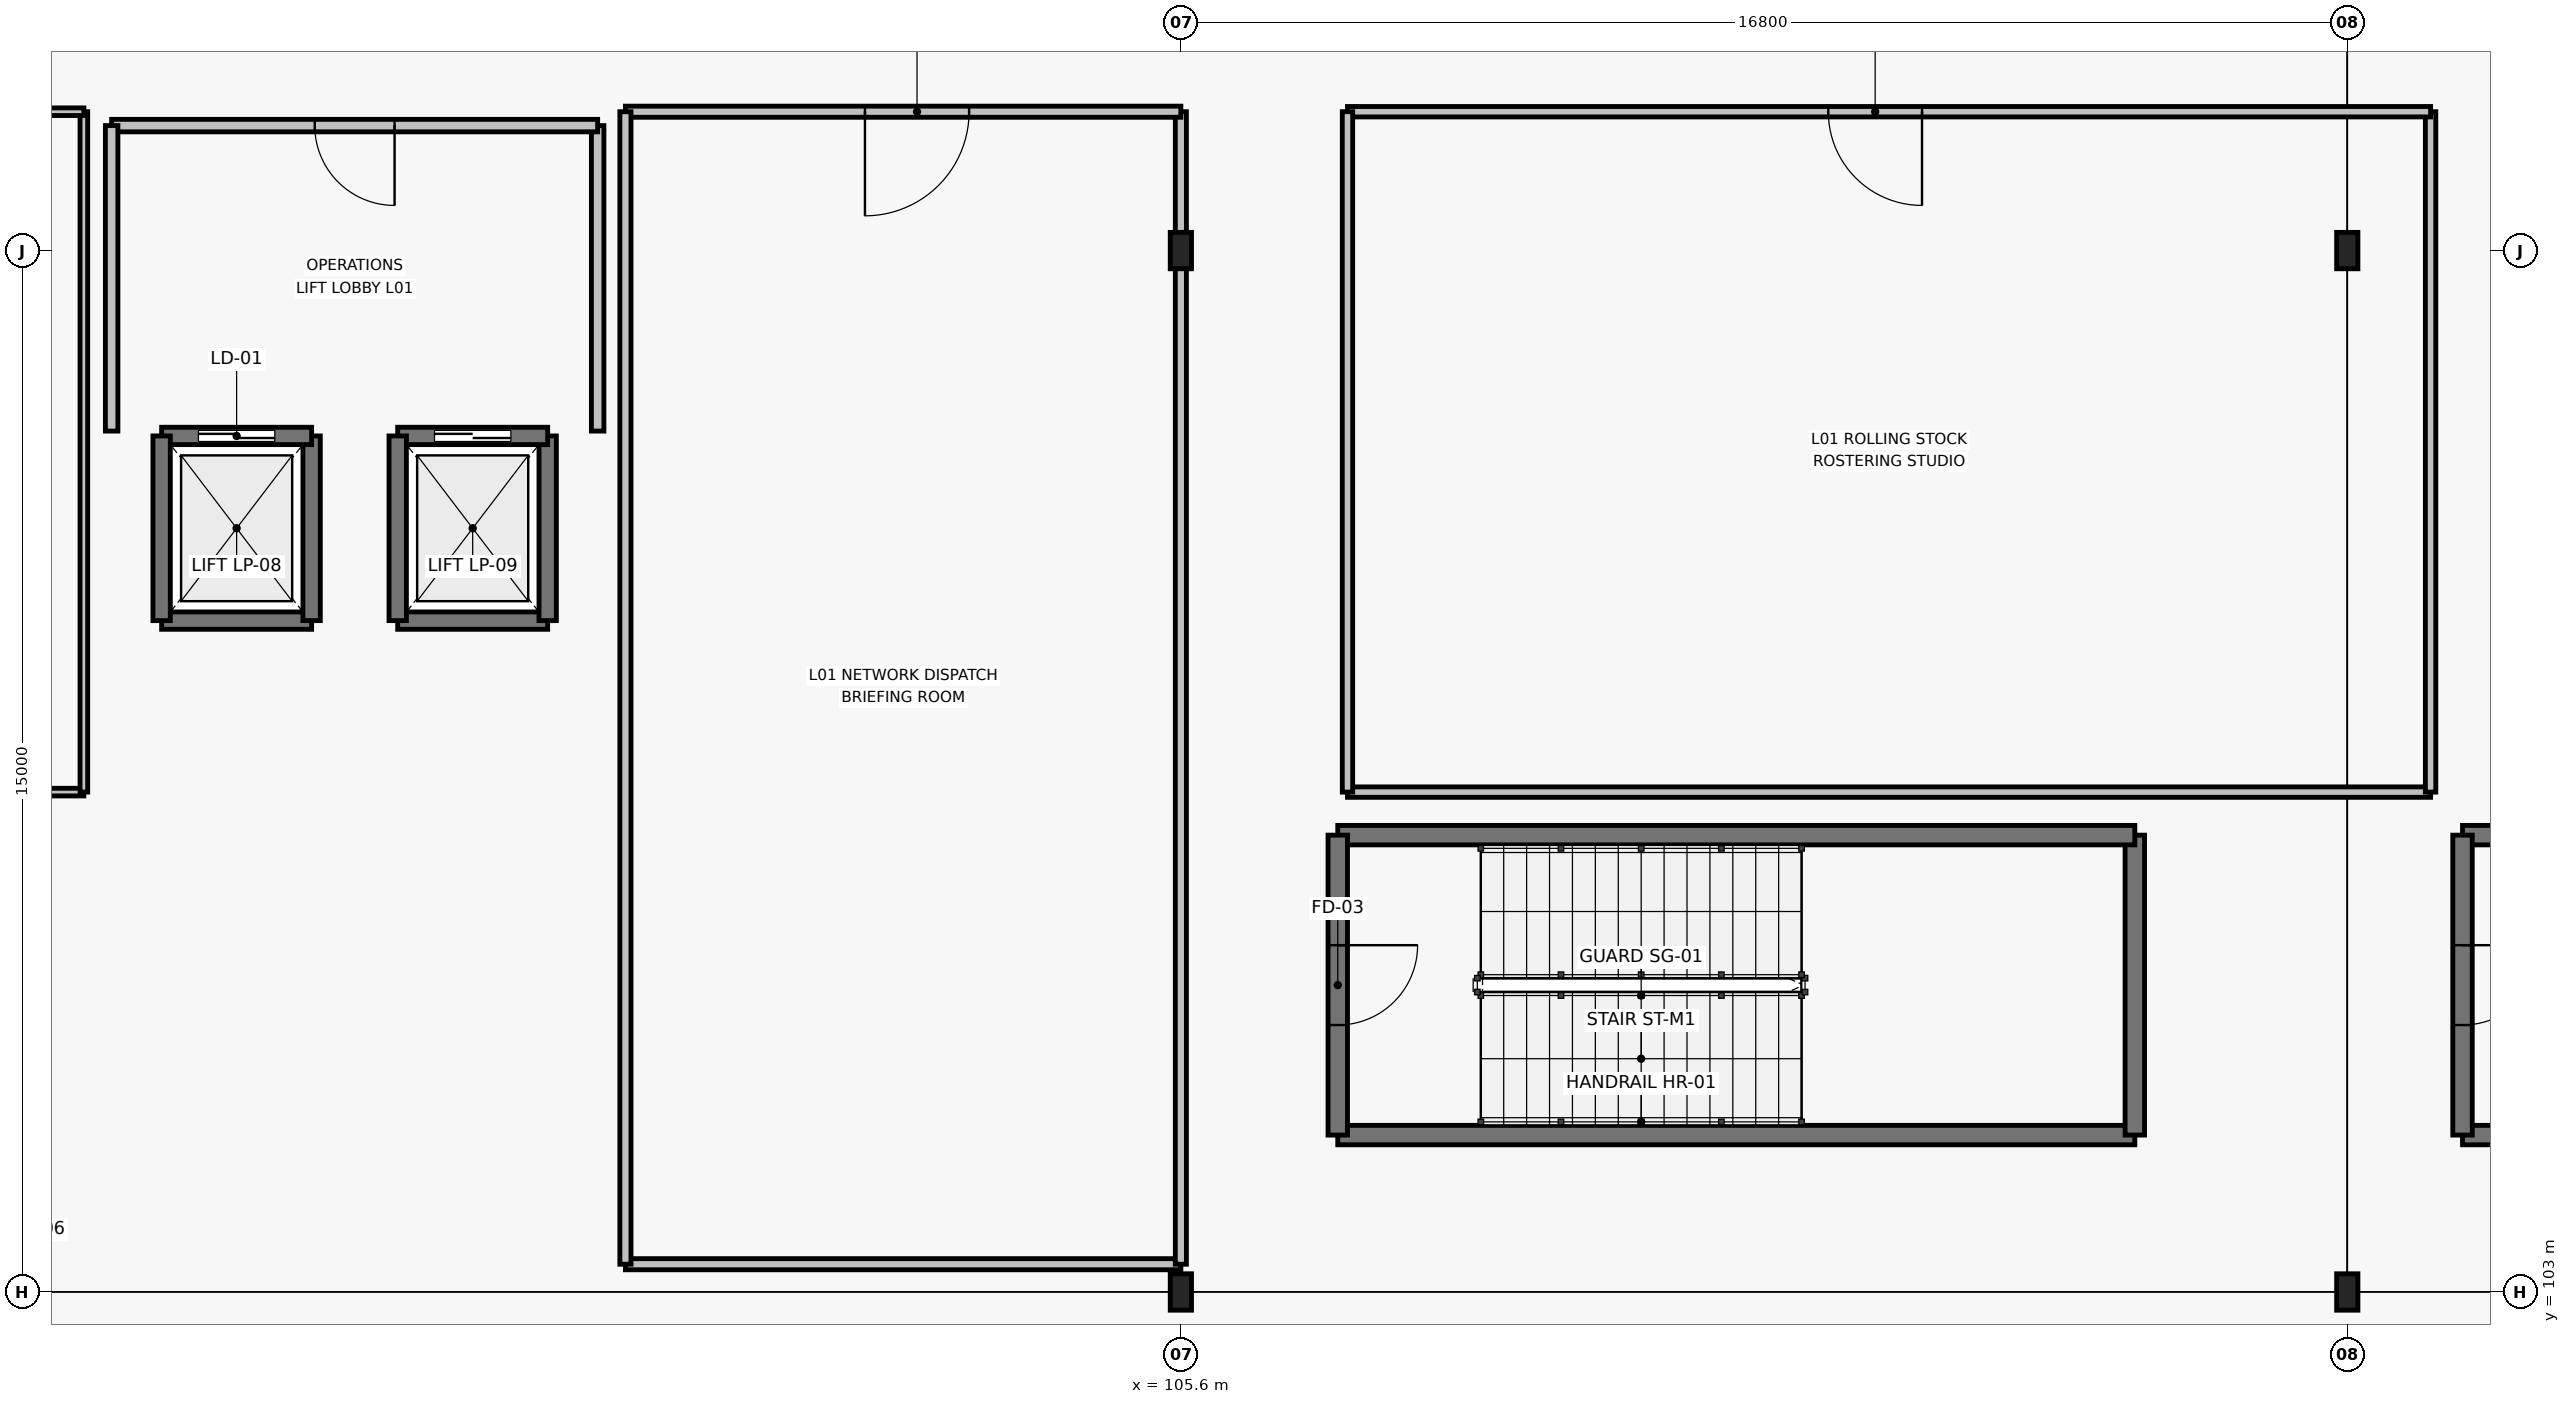
"""IFC4 building model, lengths in metres.
Left out: names, types, materials, properties, quantities, classifications, styles, units other than length and angle.
Written with IfcOpenShell. Run it as: python <this file> out.ifc"""

import sys

from ifc_helpers import new_model, si_unit, direction, frame, frame_2d, origin, origin_2d, place, context, subcontext, project, spatial, rectangle, i_section, extrude, element, fill, save


model = new_model("IFC4")
c1 = context("Model", 3, precision=1e-05, world=origin(), true_north=direction((0.0, 1.0)))
c2 = subcontext(c1, "Body", "Model", "MODEL_VIEW")
j1 = project(units=[si_unit("LENGTHUNIT", "METRE"), si_unit("PLANEANGLEUNIT", "RADIAN")], contexts=[c1])
p1 = place(None, origin())
s1 = spatial("IfcSite", under=j1, at=p1, CompositionType="ELEMENT")
p2 = place(p1, origin())
s2 = spatial("IfcBuilding", under=s1, at=p2, CompositionType="ELEMENT")
p3 = place(p2, frame((0.0, 0.0, 5.4)))
s3 = spatial("IfcBuildingStorey", under=s2, at=p3, CompositionType="ELEMENT", Elevation=5.4)
for number, where, z_axis, x_axis in (
    (1, (105.6, 103.0, 0.0), (0.0, 0.0, 1.0), (1.0, 0.0, 0.0)),
    (2, (105.6, 118.0, 0.0), (0.0, 0.0, 1.0), (1.0, 0.0, 0.0)),
    (3, (122.4, 103.0, 0.0), (0.0, 0.0, 1.0), (1.0, 0.0, 0.0)),
    (4, (122.4, 118.0, 0.0), (0.0, 0.0, 1.0), (1.0, 0.0, 0.0)),
):
    element("IfcColumn", number, at=place(p3, frame(where, z_axis=z_axis, x_axis=x_axis)), inside=s3, PredefinedType="COLUMN", context=c2, shape_type="SweptSolid", body=[
        extrude(i_section(OverallWidth=0.306, OverallDepth=0.524, WebThickness=0.021, FlangeThickness=0.04, FilletRadius=0.027, at=origin_2d()), origin(), (0.0, 0.0, 1.0), 5.4),
    ])
p4 = place(p3, frame((107.86, 105.26, 0.0), z_axis=(0.0, 0.0, 1.0), x_axis=(1.0, 0.0, 0.0)))
e5 = element("IfcWall", 5, at=p4, inside=s3, PredefinedType="SHEAR", context=c2, shape_type="SweptSolid", body=[
    extrude(rectangle(XDim=11.48, YDim=0.28, at=frame_2d((5.74, 0.0))), origin(), (0.0, 0.0, 1.0), 5.16),
])
p5 = place(p3, frame((119.34, 105.26, 0.0), z_axis=(0.0, 0.0, 1.0), x_axis=(0.0, 1.0, 0.0)))
e6 = element("IfcWall", 6, at=p5, inside=s3, PredefinedType="SHEAR", context=c2, shape_type="SweptSolid", body=[
    extrude(rectangle(XDim=4.32, YDim=0.28, at=frame_2d((2.16, 0.0))), origin(), (0.0, 0.0, 1.0), 5.16),
])
p6 = place(p3, frame((119.34, 109.58, 0.0), z_axis=(0.0, 0.0, 1.0), x_axis=(-1.0, 0.0, 0.0)))
e7 = element("IfcWall", 7, at=p6, inside=s3, PredefinedType="SHEAR", context=c2, shape_type="SweptSolid", body=[
    extrude(rectangle(XDim=11.48, YDim=0.28, at=frame_2d((5.74, 0.0))), origin(), (0.0, 0.0, 1.0), 5.16),
])
p7 = place(p3, frame((107.86, 109.58, 0.0), z_axis=(0.0, 0.0, 1.0), x_axis=(0.0, -1.0, 0.0)))
e8 = element("IfcWall", 8, at=p7, inside=s3, PredefinedType="SHEAR", context=c2, shape_type="SweptSolid", body=[
    extrude(rectangle(XDim=4.32, YDim=0.28, at=frame_2d((2.16, 0.0))), origin(), (0.0, 0.0, 1.0), 5.16),
])
p8 = place(p7, frame((1.585, 0.0, 0.0)))
e9 = element("IfcOpeningElement", 9, at=p8, cuts=e8, PredefinedType="OPENING", context=c2, shape_type="SweptSolid", body=[
    extrude(rectangle(XDim=1.15, YDim=2.2, at=frame_2d((0.575, 1.1))), frame((0.0, 0.15, 0.0), z_axis=(0.0, -1.0, 0.0), x_axis=(1.0, 0.0, 0.0)), (0.0, 0.0, 1.0), 0.3),
])
for number, where, z_axis, x_axis in (
    (10, (124.06, 105.26, 0.0), (0.0, 0.0, 1.0), (1.0, 0.0, 0.0)),
    (11, (135.54, 109.58, 0.0), (0.0, 0.0, 1.0), (-1.0, 0.0, 0.0)),
):
    element("IfcWall", number, at=place(p3, frame(where, z_axis=z_axis, x_axis=x_axis)), inside=s3, PredefinedType="SHEAR", context=c2, shape_type="SweptSolid", body=[
        extrude(rectangle(XDim=11.48, YDim=0.28, at=frame_2d((5.74, 0.0))), origin(), (0.0, 0.0, 1.0), 5.16),
    ])
p9 = place(p3, frame((124.06, 109.58, 0.0), z_axis=(0.0, 0.0, 1.0), x_axis=(0.0, -1.0, 0.0)))
e12 = element("IfcWall", 12, at=p9, inside=s3, PredefinedType="SHEAR", context=c2, shape_type="SweptSolid", body=[
    extrude(rectangle(XDim=4.32, YDim=0.28, at=frame_2d((2.16, 0.0))), origin(), (0.0, 0.0, 1.0), 5.16),
])
p10 = place(p9, frame((1.585, 0.0, 0.0)))
e13 = element("IfcOpeningElement", 13, at=p10, cuts=e12, PredefinedType="OPENING", context=c2, shape_type="SweptSolid", body=[
    extrude(rectangle(XDim=1.15, YDim=2.2, at=frame_2d((0.575, 1.1))), frame((0.0, 0.15, 0.0), z_axis=(0.0, -1.0, 0.0), x_axis=(1.0, 0.0, 0.0)), (0.0, 0.0, 1.0), 0.3),
])
p11 = place(p3, frame((90.92, 112.67, 0.0), z_axis=(0.0, 0.0, 1.0), x_axis=(1.0, 0.0, 0.0)))
e14 = element("IfcWall", 14, at=p11, inside=s3, PredefinedType="SHEAR", context=c2, shape_type="SweptSolid", body=[
    extrude(rectangle(XDim=2.16, YDim=0.25, at=frame_2d((1.08, 0.0))), origin(), (0.0, 0.0, 1.0), 5.16),
])
p12 = place(p3, frame((93.08, 112.67, 0.0), z_axis=(0.0, 0.0, 1.0), x_axis=(0.0, 1.0, 0.0)))
e15 = element("IfcWall", 15, at=p12, inside=s3, PredefinedType="SHEAR", context=c2, shape_type="SweptSolid", body=[
    extrude(rectangle(XDim=2.66, YDim=0.25, at=frame_2d((1.33, 0.0))), origin(), (0.0, 0.0, 1.0), 5.16),
])
p13 = place(p3, frame((93.08, 115.33, 0.0), z_axis=(0.0, 0.0, 1.0), x_axis=(-1.0, 0.0, 0.0)))
e16 = element("IfcWall", 16, at=p13, inside=s3, PredefinedType="SHEAR", context=c2, shape_type="SweptSolid", body=[
    extrude(rectangle(XDim=2.16, YDim=0.25, at=frame_2d((1.08, 0.0))), origin(), (0.0, 0.0, 1.0), 5.16),
])
p14 = place(p13, frame((0.53, 0.0, 0.0)))
e17 = element("IfcOpeningElement", 17, at=p14, cuts=e16, PredefinedType="OPENING", context=c2, shape_type="SweptSolid", body=[
    extrude(rectangle(XDim=1.1, YDim=2.2, at=frame_2d((0.55, 1.1))), frame((0.0, 0.135, 0.0), z_axis=(0.0, -1.0, 0.0), x_axis=(1.0, 0.0, 0.0)), (0.0, 0.0, 1.0), 0.27),
])
p15 = place(p3, frame((90.92, 115.33, 0.0), z_axis=(0.0, 0.0, 1.0), x_axis=(0.0, -1.0, 0.0)))
e18 = element("IfcWall", 18, at=p15, inside=s3, PredefinedType="SHEAR", context=c2, shape_type="SweptSolid", body=[
    extrude(rectangle(XDim=2.66, YDim=0.25, at=frame_2d((1.33, 0.0))), origin(), (0.0, 0.0, 1.0), 5.16),
])
p16 = place(p3, frame((94.32, 112.67, 0.0), z_axis=(0.0, 0.0, 1.0), x_axis=(1.0, 0.0, 0.0)))
e19 = element("IfcWall", 19, at=p16, inside=s3, PredefinedType="SHEAR", context=c2, shape_type="SweptSolid", body=[
    extrude(rectangle(XDim=2.16, YDim=0.25, at=frame_2d((1.08, 0.0))), origin(), (0.0, 0.0, 1.0), 5.16),
])
p17 = place(p3, frame((96.48, 112.67, 0.0), z_axis=(0.0, 0.0, 1.0), x_axis=(0.0, 1.0, 0.0)))
e20 = element("IfcWall", 20, at=p17, inside=s3, PredefinedType="SHEAR", context=c2, shape_type="SweptSolid", body=[
    extrude(rectangle(XDim=2.66, YDim=0.25, at=frame_2d((1.33, 0.0))), origin(), (0.0, 0.0, 1.0), 5.16),
])
p18 = place(p3, frame((96.48, 115.33, 0.0), z_axis=(0.0, 0.0, 1.0), x_axis=(-1.0, 0.0, 0.0)))
e21 = element("IfcWall", 21, at=p18, inside=s3, PredefinedType="SHEAR", context=c2, shape_type="SweptSolid", body=[
    extrude(rectangle(XDim=2.16, YDim=0.25, at=frame_2d((1.08, 0.0))), origin(), (0.0, 0.0, 1.0), 5.16),
])
p19 = place(p18, frame((0.53, 0.0, 0.0)))
e22 = element("IfcOpeningElement", 22, at=p19, cuts=e21, PredefinedType="OPENING", context=c2, shape_type="SweptSolid", body=[
    extrude(rectangle(XDim=1.1, YDim=2.2, at=frame_2d((0.55, 1.1))), frame((0.0, 0.135, 0.0), z_axis=(0.0, -1.0, 0.0), x_axis=(1.0, 0.0, 0.0)), (0.0, 0.0, 1.0), 0.27),
])
p20 = place(p3, frame((94.32, 115.33, 0.0), z_axis=(0.0, 0.0, 1.0), x_axis=(0.0, -1.0, 0.0)))
e23 = element("IfcWall", 23, at=p20, inside=s3, PredefinedType="SHEAR", context=c2, shape_type="SweptSolid", body=[
    extrude(rectangle(XDim=2.66, YDim=0.25, at=frame_2d((1.33, 0.0))), origin(), (0.0, 0.0, 1.0), 5.16),
])
p21 = place(p3, frame((97.2, 115.4, 0.0), z_axis=(0.0, 0.0, 1.0), x_axis=(0.0, 1.0, 0.0)))
e24 = element("IfcWall", 24, at=p21, inside=s3, PredefinedType="PARTITIONING", context=c2, shape_type="SweptSolid", body=[
    extrude(rectangle(XDim=4.4, YDim=0.18, at=frame_2d((2.2, 0.0))), origin(), (0.0, 0.0, 1.0), 5.16),
])
p22 = place(p3, frame((97.2, 119.8, 0.0), z_axis=(0.0, 0.0, 1.0), x_axis=(-1.0, 0.0, 0.0)))
e25 = element("IfcWall", 25, at=p22, inside=s3, PredefinedType="PARTITIONING", context=c2, shape_type="SweptSolid", body=[
    extrude(rectangle(XDim=7.0, YDim=0.18, at=frame_2d((3.5, 0.0))), origin(), (0.0, 0.0, 1.0), 5.16),
])
p23 = place(p22, frame((2.925, 0.0, 0.0)))
e26 = element("IfcOpeningElement", 26, at=p23, cuts=e25, PredefinedType="OPENING", context=c2, shape_type="SweptSolid", body=[
    extrude(rectangle(XDim=1.15, YDim=2.2, at=frame_2d((0.575, 1.1))), frame((0.0, 0.1, 0.0), z_axis=(0.0, -1.0, 0.0), x_axis=(1.0, 0.0, 0.0)), (0.0, 0.0, 1.0), 0.2),
])
p24 = place(p3, frame((90.2, 119.8, 0.0), z_axis=(0.0, 0.0, 1.0), x_axis=(0.0, -1.0, 0.0)))
e27 = element("IfcWall", 27, at=p24, inside=s3, PredefinedType="PARTITIONING", context=c2, shape_type="SweptSolid", body=[
    extrude(rectangle(XDim=4.4, YDim=0.18, at=frame_2d((2.2, 0.0))), origin(), (0.0, 0.0, 1.0), 5.16),
])
p25 = place(p3, frame((82.6, 110.2, 0.0), z_axis=(0.0, 0.0, 1.0), x_axis=(1.0, 0.0, 0.0)))
e28 = element("IfcWall", 28, at=p25, inside=s3, PredefinedType="MOVABLE", context=c2, shape_type="SweptSolid", body=[
    extrude(rectangle(XDim=7.2, YDim=0.11, at=frame_2d((3.6, 0.0))), origin(), (0.0, 0.0, 1.0), 5.16),
])
p26 = place(p3, frame((89.8, 110.2, 0.0), z_axis=(0.0, 0.0, 1.0), x_axis=(0.0, 1.0, 0.0)))
e29 = element("IfcWall", 29, at=p26, inside=s3, PredefinedType="MOVABLE", context=c2, shape_type="SweptSolid", body=[
    extrude(rectangle(XDim=9.8, YDim=0.11, at=frame_2d((4.9, 0.0))), origin(), (0.0, 0.0, 1.0), 5.16),
])
p27 = place(p3, frame((89.8, 120.0, 0.0), z_axis=(0.0, 0.0, 1.0), x_axis=(-1.0, 0.0, 0.0)))
e30 = element("IfcWall", 30, at=p27, inside=s3, PredefinedType="MOVABLE", context=c2, shape_type="SweptSolid", body=[
    extrude(rectangle(XDim=7.2, YDim=0.11, at=frame_2d((3.6, 0.0))), origin(), (0.0, 0.0, 1.0), 5.16),
])
p28 = place(p27, frame((3.16, 0.0, 0.0)))
e31 = element("IfcOpeningElement", 31, at=p28, cuts=e30, PredefinedType="OPENING", context=c2, shape_type="SweptSolid", body=[
    extrude(rectangle(XDim=1.28, YDim=2.22, at=frame_2d((0.64, 1.11))), frame((0.0, 0.065, 0.0), z_axis=(0.0, -1.0, 0.0), x_axis=(1.0, 0.0, 0.0)), (0.0, 0.0, 1.0), 0.13),
])
p29 = place(p3, frame((97.6, 103.4, 0.0), z_axis=(0.0, 0.0, 1.0), x_axis=(1.0, 0.0, 0.0)))
e32 = element("IfcWall", 32, at=p29, inside=s3, PredefinedType="PARTITIONING", context=c2, shape_type="SweptSolid", body=[
    extrude(rectangle(XDim=8.0, YDim=0.16, at=frame_2d((4.0, 0.0))), origin(), (0.0, 0.0, 1.0), 4.765),
])
p30 = place(p3, frame((105.6, 103.4, 0.0), z_axis=(0.0, 0.0, 1.0), x_axis=(0.0, 1.0, 0.0)))
e33 = element("IfcWall", 33, at=p30, inside=s3, PredefinedType="PARTITIONING", context=c2, shape_type="SweptSolid", body=[
    extrude(rectangle(XDim=16.6, YDim=0.16, at=frame_2d((8.3, 0.0))), origin(), (0.0, 0.0, 1.0), 4.655),
])
p31 = place(p3, frame((105.6, 120.0, 0.0), z_axis=(0.0, 0.0, 1.0), x_axis=(-1.0, 0.0, 0.0)))
e34 = element("IfcWall", 34, at=p31, inside=s3, PredefinedType="PARTITIONING", context=c2, shape_type="SweptSolid", body=[
    extrude(rectangle(XDim=8.0, YDim=0.16, at=frame_2d((4.0, 0.0))), origin(), (0.0, 0.0, 1.0), 5.16),
])
p32 = place(p31, frame((4.55, 0.0, 0.0), z_axis=(0.0, 0.0, 1.0), x_axis=(-1.0, 0.0, 0.0)))
e35 = element("IfcOpeningElement", 35, at=p32, cuts=e34, PredefinedType="OPENING", context=c2, shape_type="SweptSolid", body=[
    extrude(rectangle(XDim=1.5, YDim=2.25, at=frame_2d((0.75, 1.125))), frame((0.0, 0.09, 0.0), z_axis=(0.0, -1.0, 0.0), x_axis=(1.0, 0.0, 0.0)), (0.0, 0.0, 1.0), 0.18),
])
p33 = place(p3, frame((97.6, 120.0, 0.0), z_axis=(0.0, 0.0, 1.0), x_axis=(0.0, -1.0, 0.0)))
e36 = element("IfcWall", 36, at=p33, inside=s3, PredefinedType="PARTITIONING", context=c2, shape_type="SweptSolid", body=[
    extrude(rectangle(XDim=16.6, YDim=0.16, at=frame_2d((8.3, 0.0))), origin(), (0.0, 0.0, 1.0), 5.16),
])
p34 = place(p3, frame((108.0, 110.2, 0.0), z_axis=(0.0, 0.0, 1.0), x_axis=(1.0, 0.0, 0.0)))
e37 = element("IfcWall", 37, at=p34, inside=s3, PredefinedType="PARTITIONING", context=c2, shape_type="SweptSolid", body=[
    extrude(rectangle(XDim=15.6, YDim=0.15, at=frame_2d((7.8, 0.0))), origin(), (0.0, 0.0, 1.0), 5.16),
])
p35 = place(p3, frame((123.6, 110.2, 0.0), z_axis=(0.0, 0.0, 1.0), x_axis=(0.0, 1.0, 0.0)))
e38 = element("IfcWall", 38, at=p35, inside=s3, PredefinedType="PARTITIONING", context=c2, shape_type="SweptSolid", body=[
    extrude(rectangle(XDim=9.8, YDim=0.15, at=frame_2d((4.9, 0.0))), origin(), (0.0, 0.0, 1.0), 5.16),
])
p36 = place(p3, frame((123.6, 120.0, 0.0), z_axis=(0.0, 0.0, 1.0), x_axis=(-1.0, 0.0, 0.0)))
e39 = element("IfcWall", 39, at=p36, inside=s3, PredefinedType="PARTITIONING", context=c2, shape_type="SweptSolid", body=[
    extrude(rectangle(XDim=15.6, YDim=0.15, at=frame_2d((7.8, 0.0))), origin(), (0.0, 0.0, 1.0), 5.16),
])
p37 = place(p36, frame((7.325, 0.0, 0.0)))
e40 = element("IfcOpeningElement", 40, at=p37, cuts=e39, PredefinedType="OPENING", context=c2, shape_type="SweptSolid", body=[
    extrude(rectangle(XDim=1.35, YDim=2.2, at=frame_2d((0.675, 1.1))), frame((0.0, 0.085, 0.0), z_axis=(0.0, -1.0, 0.0), x_axis=(1.0, 0.0, 0.0)), (0.0, 0.0, 1.0), 0.17),
])
p38 = place(p3, frame((108.0, 120.0, 0.0), z_axis=(0.0, 0.0, 1.0), x_axis=(0.0, -1.0, 0.0)))
e41 = element("IfcWall", 41, at=p38, inside=s3, PredefinedType="PARTITIONING", context=c2, shape_type="SweptSolid", body=[
    extrude(rectangle(XDim=9.8, YDim=0.15, at=frame_2d((4.9, 0.0))), origin(), (0.0, 0.0, 1.0), 5.16),
])
p39 = place(p8, origin())
e42 = element("IfcDoor", 42, at=p39, inside=s3, OperationType="SINGLE_SWING_LEFT", PredefinedType="DOOR", context=c2, shape_type="SweptSolid", body=[
    extrude(rectangle(XDim=1.15, YDim=2.2, at=frame_2d((0.575, 1.1))), frame((0.0, 0.025, 0.0), z_axis=(0.0, -1.0, 0.0), x_axis=(1.0, 0.0, 0.0)), (0.0, 0.0, 1.0), 0.05),
])
fill(e9, e42)
p40 = place(p10, origin())
e43 = element("IfcDoor", 43, at=p40, inside=s3, OperationType="SINGLE_SWING_LEFT", PredefinedType="DOOR", context=c2, shape_type="SweptSolid", body=[
    extrude(rectangle(XDim=1.15, YDim=2.2, at=frame_2d((0.575, 1.1))), frame((0.0, 0.025, 0.0), z_axis=(0.0, -1.0, 0.0), x_axis=(1.0, 0.0, 0.0)), (0.0, 0.0, 1.0), 0.05),
])
fill(e13, e43)
p41 = place(p14, origin())
e44 = element("IfcDoor", 44, at=p41, inside=s3, OperationType="SLIDING_TO_LEFT", PredefinedType="DOOR", context=c2, shape_type="SweptSolid", body=[
    extrude(rectangle(XDim=1.1, YDim=2.2, at=frame_2d((0.55, 1.1))), frame((0.0, 0.025, 0.0), z_axis=(0.0, -1.0, 0.0), x_axis=(1.0, 0.0, 0.0)), (0.0, 0.0, 1.0), 0.05),
])
fill(e17, e44)
p42 = place(p19, origin())
e45 = element("IfcDoor", 45, at=p42, inside=s3, OperationType="SLIDING_TO_LEFT", PredefinedType="DOOR", context=c2, shape_type="SweptSolid", body=[
    extrude(rectangle(XDim=1.1, YDim=2.2, at=frame_2d((0.55, 1.1))), frame((0.0, 0.025, 0.0), z_axis=(0.0, -1.0, 0.0), x_axis=(1.0, 0.0, 0.0)), (0.0, 0.0, 1.0), 0.05),
])
fill(e22, e45)
p43 = place(p23, origin())
e46 = element("IfcDoor", 46, at=p43, inside=s3, OperationType="SINGLE_SWING_LEFT", PredefinedType="DOOR", context=c2, shape_type="SweptSolid", body=[
    extrude(rectangle(XDim=1.15, YDim=2.2, at=frame_2d((0.575, 1.1))), frame((0.0, 0.025, 0.0), z_axis=(0.0, -1.0, 0.0), x_axis=(1.0, 0.0, 0.0)), (0.0, 0.0, 1.0), 0.05),
])
fill(e26, e46)
p44 = place(p32, origin())
e47 = element("IfcDoor", 47, at=p44, inside=s3, OperationType="SINGLE_SWING_RIGHT", PredefinedType="DOOR", context=c2, shape_type="SweptSolid", body=[
    extrude(rectangle(XDim=1.5, YDim=2.25, at=frame_2d((0.75, 1.125))), frame((0.0, 0.025, 0.0), z_axis=(0.0, -1.0, 0.0), x_axis=(1.0, 0.0, 0.0)), (0.0, 0.0, 1.0), 0.05),
])
fill(e35, e47)
p45 = place(p37, origin())
e48 = element("IfcDoor", 48, at=p45, inside=s3, OperationType="SINGLE_SWING_LEFT", PredefinedType="DOOR", context=c2, shape_type="SweptSolid", body=[
    extrude(rectangle(XDim=1.35, YDim=2.2, at=frame_2d((0.675, 1.1))), frame((0.0, 0.025, 0.0), z_axis=(0.0, -1.0, 0.0), x_axis=(1.0, 0.0, 0.0)), (0.0, 0.0, 1.0), 0.05),
])
fill(e40, e48)
save(model, sys.argv[1])
